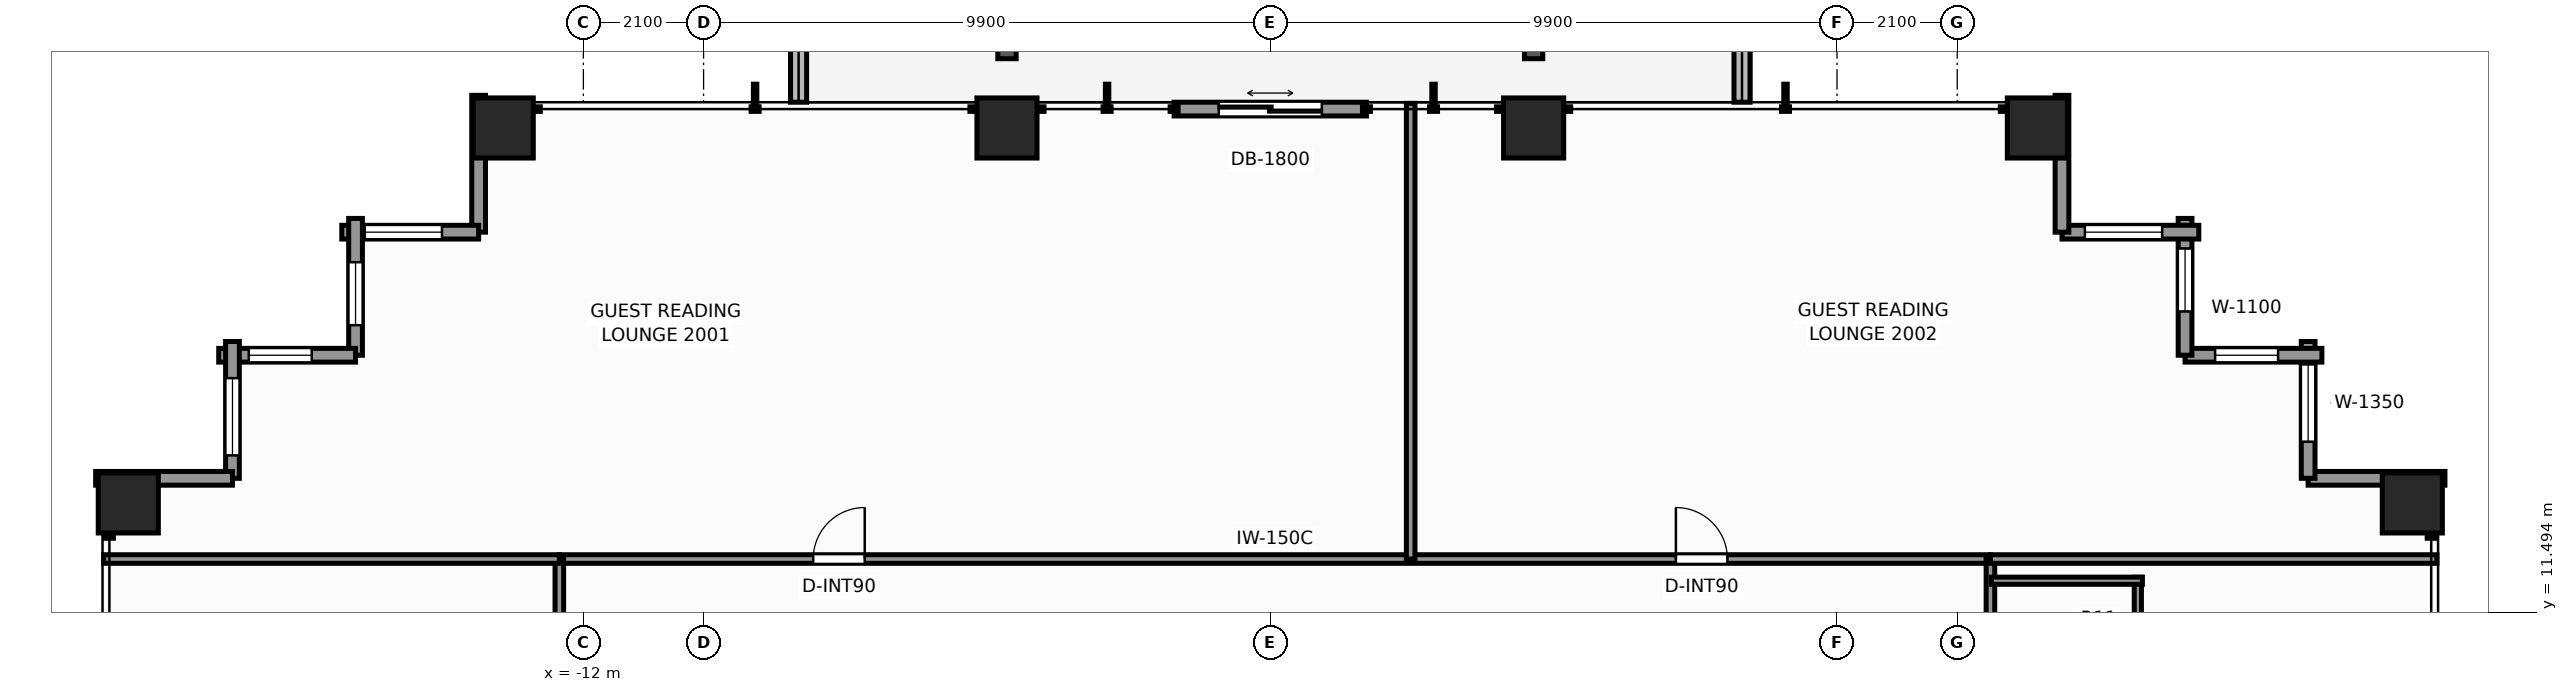
"""IFC4 building model, lengths in metres.
Left out: names, types, materials, properties, quantities, classifications, styles, units other than length and angle.
Written with IfcOpenShell. Run it as: python <this file> out.ifc"""

import sys

from ifc_helpers import new_model, si_unit, direction, frame, frame_2d, origin, origin_2d, place, context, subcontext, project, spatial, rectangle, extrude, element, fill, save


model = new_model("IFC4")
c1 = context("Model", 3, precision=1e-05, world=origin(), true_north=direction((0.0, 1.0)))
c2 = subcontext(c1, "Body", "Model", "MODEL_VIEW")
j1 = project(units=[si_unit("LENGTHUNIT", "METRE"), si_unit("PLANEANGLEUNIT", "RADIAN")], contexts=[c1])
p1 = place(None, origin())
s1 = spatial("IfcSite", under=j1, at=p1, CompositionType="ELEMENT")
p2 = place(p1, origin())
s2 = spatial("IfcBuilding", under=s1, at=p2, CompositionType="ELEMENT")
p3 = place(p2, frame((0.0, 0.0, 72.2)))
s3 = spatial("IfcBuildingStorey", under=s2, at=p3, CompositionType="ELEMENT", Elevation=72.2)
for number, where, z_axis, x_axis in (
    (1, (-13.4, 19.95, 0.0), (0.0, 0.0, 1.0), (1.0, 0.0, 0.0)),
    (2, (-4.6, 19.95, 0.0), (0.0, 0.0, 1.0), (1.0, 0.0, 0.0)),
    (3, (4.6, 19.95, 0.0), (0.0, 0.0, 1.0), (1.0, 0.0, 0.0)),
    (4, (13.4, 19.95, 0.0), (0.0, 0.0, 1.0), (1.0, 0.0, 0.0)),
    (5, (-19.95, 13.4, 0.0), (0.0, 0.0, 1.0), (1.0, 0.0, 0.0)),
    (6, (19.95, 13.4, 0.0), (0.0, 0.0, 1.0), (1.0, 0.0, 0.0)),
):
    element("IfcColumn", number, at=place(p3, frame(where, z_axis=z_axis, x_axis=x_axis)), inside=s3, PredefinedType="COLUMN", context=c2, shape_type="SweptSolid", body=[
        extrude(rectangle(XDim=1.05, YDim=1.05, at=origin_2d()), origin(), (0.0, 0.0, 1.0), 3.3),
    ])
p4 = place(p3, frame((8.24, 20.4, -0.04), z_axis=(0.0, 0.0, 1.0), x_axis=(0.0, 1.0, 0.0)))
e7 = element("IfcWall", 7, at=p4, inside=s3, PredefinedType="PARAPET", context=c2, shape_type="SweptSolid", body=[
    extrude(rectangle(XDim=1.313, YDim=0.28, at=frame_2d((0.656, 0.0))), origin(), (0.0, 0.0, 1.0), 0.42),
])
p5 = place(p3, frame((-8.24, 22.74, -0.04), z_axis=(0.0, 0.0, 1.0), x_axis=(0.0, -1.0, 0.0)))
e8 = element("IfcWall", 8, at=p5, inside=s3, PredefinedType="PARAPET", context=c2, shape_type="SweptSolid", body=[
    extrude(rectangle(XDim=2.34, YDim=0.28, at=frame_2d((1.17, 0.0))), origin(), (0.0, 0.0, 1.0), 0.42),
])
p6 = place(p3, frame((18.13, 13.83, 0.0), z_axis=(0.0, 0.0, 1.0), x_axis=(1.0, 0.0, 0.0)))
e9 = element("IfcWall", 9, at=p6, inside=s3, PredefinedType="STANDARD", context=c2, shape_type="SweptSolid", body=[
    extrude(rectangle(XDim=2.39, YDim=0.24, at=frame_2d((1.195, 0.0))), origin(), (0.0, 0.0, 1.0), 2.459),
])
p7 = place(p3, frame((18.13, 16.22, 0.0), z_axis=(0.0, 0.0, 1.0), x_axis=(0.0, -1.0, 0.0)))
e10 = element("IfcWall", 10, at=p7, inside=s3, PredefinedType="STANDARD", context=c2, shape_type="SweptSolid", body=[
    extrude(rectangle(XDim=2.39, YDim=0.24, at=frame_2d((1.195, 0.0))), origin(), (0.0, 0.0, 1.0), 2.459),
])
p8 = place(p7, frame((0.4, 0.0, 0.65)))
e11 = element("IfcOpeningElement", 11, at=p8, cuts=e10, PredefinedType="OPENING", context=c2, shape_type="SweptSolid", body=[
    extrude(rectangle(XDim=1.35, YDim=1.55, at=frame_2d((0.675, 0.775))), frame((0.0, 0.13, 0.0), z_axis=(0.0, -1.0, 0.0), x_axis=(1.0, 0.0, 0.0)), (0.0, 0.0, 1.0), 0.26),
])
p9 = place(p3, frame((15.98, 15.98, 0.0), z_axis=(0.0, 0.0, 1.0), x_axis=(1.0, 0.0, 0.0)))
e12 = element("IfcWall", 12, at=p9, inside=s3, PredefinedType="STANDARD", context=c2, shape_type="SweptSolid", body=[
    extrude(rectangle(XDim=2.39, YDim=0.24, at=frame_2d((1.195, 0.0))), origin(), (0.0, 0.0, 1.0), 2.459),
])
p10 = place(p9, frame((0.525, 0.0, 0.65)))
e13 = element("IfcOpeningElement", 13, at=p10, cuts=e12, PredefinedType="OPENING", context=c2, shape_type="SweptSolid", body=[
    extrude(rectangle(XDim=1.1, YDim=1.45, at=frame_2d((0.55, 0.725))), frame((0.0, 0.13, 0.0), z_axis=(0.0, -1.0, 0.0), x_axis=(1.0, 0.0, 0.0)), (0.0, 0.0, 1.0), 0.26),
])
p11 = place(p3, frame((15.98, 18.37, 0.0), z_axis=(0.0, 0.0, 1.0), x_axis=(0.0, -1.0, 0.0)))
e14 = element("IfcWall", 14, at=p11, inside=s3, PredefinedType="STANDARD", context=c2, shape_type="SweptSolid", body=[
    extrude(rectangle(XDim=2.39, YDim=0.24, at=frame_2d((1.195, 0.0))), origin(), (0.0, 0.0, 1.0), 2.459),
])
p12 = place(p11, frame((0.525, 0.0, 0.65)))
e15 = element("IfcOpeningElement", 15, at=p12, cuts=e14, PredefinedType="OPENING", context=c2, shape_type="SweptSolid", body=[
    extrude(rectangle(XDim=1.1, YDim=1.45, at=frame_2d((0.55, 0.725))), frame((0.0, 0.13, 0.0), z_axis=(0.0, -1.0, 0.0), x_axis=(1.0, 0.0, 0.0)), (0.0, 0.0, 1.0), 0.26),
])
p13 = place(p3, frame((13.83, 18.13, 0.0), z_axis=(0.0, 0.0, 1.0), x_axis=(1.0, 0.0, 0.0)))
e16 = element("IfcWall", 16, at=p13, inside=s3, PredefinedType="STANDARD", context=c2, shape_type="SweptSolid", body=[
    extrude(rectangle(XDim=2.39, YDim=0.24, at=frame_2d((1.195, 0.0))), origin(), (0.0, 0.0, 1.0), 2.459),
])
p14 = place(p13, frame((0.4, 0.0, 0.65)))
e17 = element("IfcOpeningElement", 17, at=p14, cuts=e16, PredefinedType="OPENING", context=c2, shape_type="SweptSolid", body=[
    extrude(rectangle(XDim=1.35, YDim=1.55, at=frame_2d((0.675, 0.775))), frame((0.0, 0.13, 0.0), z_axis=(0.0, -1.0, 0.0), x_axis=(1.0, 0.0, 0.0)), (0.0, 0.0, 1.0), 0.26),
])
p15 = place(p3, frame((13.83, 20.52, 0.0), z_axis=(0.0, 0.0, 1.0), x_axis=(0.0, -1.0, 0.0)))
e18 = element("IfcWall", 18, at=p15, inside=s3, PredefinedType="STANDARD", context=c2, shape_type="SweptSolid", body=[
    extrude(rectangle(XDim=2.39, YDim=0.24, at=frame_2d((1.195, 0.0))), origin(), (0.0, 0.0, 1.0), 2.459),
])
p16 = place(p3, frame((-1.68, 20.28, 0.0), z_axis=(0.0, 0.0, 1.0), x_axis=(1.0, 0.0, 0.0)))
e19 = element("IfcWall", 19, at=p16, inside=s3, PredefinedType="STANDARD", context=c2, shape_type="SweptSolid", body=[
    extrude(rectangle(XDim=3.36, YDim=0.24, at=frame_2d((1.68, 0.0))), origin(), (0.0, 0.0, 1.0), 3.08),
])
p17 = place(p16, frame((0.78, 0.0, 0.0)))
e20 = element("IfcOpeningElement", 20, at=p17, cuts=e19, PredefinedType="OPENING", context=c2, shape_type="SweptSolid", body=[
    extrude(rectangle(XDim=1.8, YDim=2.2, at=frame_2d((0.9, 1.1))), frame((0.0, 0.13, 0.0), z_axis=(0.0, -1.0, 0.0), x_axis=(1.0, 0.0, 0.0)), (0.0, 0.0, 1.0), 0.26),
])
p18 = place(p3, frame((-13.83, 18.13, 0.0), z_axis=(0.0, 0.0, 1.0), x_axis=(0.0, 1.0, 0.0)))
e21 = element("IfcWall", 21, at=p18, inside=s3, PredefinedType="STANDARD", context=c2, shape_type="SweptSolid", body=[
    extrude(rectangle(XDim=2.39, YDim=0.24, at=frame_2d((1.195, 0.0))), origin(), (0.0, 0.0, 1.0), 2.459),
])
p19 = place(p3, frame((-16.22, 18.13, 0.0), z_axis=(0.0, 0.0, 1.0), x_axis=(1.0, 0.0, 0.0)))
e22 = element("IfcWall", 22, at=p19, inside=s3, PredefinedType="STANDARD", context=c2, shape_type="SweptSolid", body=[
    extrude(rectangle(XDim=2.39, YDim=0.24, at=frame_2d((1.195, 0.0))), origin(), (0.0, 0.0, 1.0), 2.459),
])
p20 = place(p19, frame((0.4, 0.0, 0.65)))
e23 = element("IfcOpeningElement", 23, at=p20, cuts=e22, PredefinedType="OPENING", context=c2, shape_type="SweptSolid", body=[
    extrude(rectangle(XDim=1.35, YDim=1.55, at=frame_2d((0.675, 0.775))), frame((0.0, 0.13, 0.0), z_axis=(0.0, -1.0, 0.0), x_axis=(1.0, 0.0, 0.0)), (0.0, 0.0, 1.0), 0.26),
])
p21 = place(p3, frame((-15.98, 15.98, 0.0), z_axis=(0.0, 0.0, 1.0), x_axis=(0.0, 1.0, 0.0)))
e24 = element("IfcWall", 24, at=p21, inside=s3, PredefinedType="STANDARD", context=c2, shape_type="SweptSolid", body=[
    extrude(rectangle(XDim=2.39, YDim=0.24, at=frame_2d((1.195, 0.0))), origin(), (0.0, 0.0, 1.0), 2.459),
])
p22 = place(p21, frame((0.525, 0.0, 0.65)))
e25 = element("IfcOpeningElement", 25, at=p22, cuts=e24, PredefinedType="OPENING", context=c2, shape_type="SweptSolid", body=[
    extrude(rectangle(XDim=1.1, YDim=1.45, at=frame_2d((0.55, 0.725))), frame((0.0, 0.13, 0.0), z_axis=(0.0, -1.0, 0.0), x_axis=(1.0, 0.0, 0.0)), (0.0, 0.0, 1.0), 0.26),
])
p23 = place(p3, frame((-18.37, 15.98, 0.0), z_axis=(0.0, 0.0, 1.0), x_axis=(1.0, 0.0, 0.0)))
e26 = element("IfcWall", 26, at=p23, inside=s3, PredefinedType="STANDARD", context=c2, shape_type="SweptSolid", body=[
    extrude(rectangle(XDim=2.39, YDim=0.24, at=frame_2d((1.195, 0.0))), origin(), (0.0, 0.0, 1.0), 2.459),
])
p24 = place(p23, frame((0.525, 0.0, 0.65)))
e27 = element("IfcOpeningElement", 27, at=p24, cuts=e26, PredefinedType="OPENING", context=c2, shape_type="SweptSolid", body=[
    extrude(rectangle(XDim=1.1, YDim=1.45, at=frame_2d((0.55, 0.725))), frame((0.0, 0.13, 0.0), z_axis=(0.0, -1.0, 0.0), x_axis=(1.0, 0.0, 0.0)), (0.0, 0.0, 1.0), 0.26),
])
p25 = place(p3, frame((-18.13, 13.83, 0.0), z_axis=(0.0, 0.0, 1.0), x_axis=(0.0, 1.0, 0.0)))
e28 = element("IfcWall", 28, at=p25, inside=s3, PredefinedType="STANDARD", context=c2, shape_type="SweptSolid", body=[
    extrude(rectangle(XDim=2.39, YDim=0.24, at=frame_2d((1.195, 0.0))), origin(), (0.0, 0.0, 1.0), 2.459),
])
p26 = place(p25, frame((0.4, 0.0, 0.65)))
e29 = element("IfcOpeningElement", 29, at=p26, cuts=e28, PredefinedType="OPENING", context=c2, shape_type="SweptSolid", body=[
    extrude(rectangle(XDim=1.35, YDim=1.55, at=frame_2d((0.675, 0.775))), frame((0.0, 0.13, 0.0), z_axis=(0.0, -1.0, 0.0), x_axis=(1.0, 0.0, 0.0)), (0.0, 0.0, 1.0), 0.26),
])
p27 = place(p3, frame((-20.52, 13.83, 0.0), z_axis=(0.0, 0.0, 1.0), x_axis=(1.0, 0.0, 0.0)))
e30 = element("IfcWall", 30, at=p27, inside=s3, PredefinedType="STANDARD", context=c2, shape_type="SweptSolid", body=[
    extrude(rectangle(XDim=2.39, YDim=0.24, at=frame_2d((1.195, 0.0))), origin(), (0.0, 0.0, 1.0), 2.459),
])
p28 = place(p3, frame((-12.42, 12.42, 0.0), z_axis=(0.0, 0.0, 1.0), x_axis=(1.0, 0.0, 0.0)))
e31 = element("IfcWall", 31, at=p28, inside=s3, PredefinedType="PARTITIONING", context=c2, shape_type="SweptSolid", body=[
    extrude(rectangle(XDim=25.0, YDim=0.15, at=frame_2d((12.5, 0.0))), origin(), (0.0, 0.0, 1.0), 2.292),
])
p29 = place(p28, frame((4.435, 0.0, 0.0)))
e32 = element("IfcOpeningElement", 32, at=p29, cuts=e31, PredefinedType="OPENING", context=c2, shape_type="SweptSolid", body=[
    extrude(rectangle(XDim=0.9, YDim=2.06, at=frame_2d((0.45, 1.03))), frame((0.0, 0.085, 0.0), z_axis=(0.0, -1.0, 0.0), x_axis=(1.0, 0.0, 0.0)), (0.0, 0.0, 1.0), 0.17),
])
p30 = place(p28, frame((19.505, 0.0, 0.0)))
e33 = element("IfcOpeningElement", 33, at=p30, cuts=e31, PredefinedType="OPENING", context=c2, shape_type="SweptSolid", body=[
    extrude(rectangle(XDim=0.9, YDim=2.06, at=frame_2d((0.45, 1.03))), frame((0.0, 0.085, 0.0), z_axis=(0.0, -1.0, 0.0), x_axis=(1.0, 0.0, 0.0)), (0.0, 0.0, 1.0), 0.17),
])
p31 = place(p3, frame((-12.42, 7.4, 0.0), z_axis=(0.0, 0.0, 1.0), x_axis=(0.0, 1.0, 0.0)))
e34 = element("IfcWall", 34, at=p31, inside=s3, PredefinedType="PARTITIONING", context=c2, shape_type="SweptSolid", body=[
    extrude(rectangle(XDim=5.02, YDim=0.15, at=frame_2d((2.51, 0.0))), origin(), (0.0, 0.0, 1.0), 2.292),
])
p32 = place(p31, frame((0.811, 0.0, 0.0)))
e35 = element("IfcOpeningElement", 35, at=p32, cuts=e34, PredefinedType="OPENING", context=c2, shape_type="SweptSolid", body=[
    extrude(rectangle(XDim=0.9, YDim=2.06, at=frame_2d((0.45, 1.03))), frame((0.0, 0.085, 0.0), z_axis=(0.0, -1.0, 0.0), x_axis=(1.0, 0.0, 0.0)), (0.0, 0.0, 1.0), 0.17),
])
p33 = place(p3, frame((12.58, -12.42, 0.0), z_axis=(0.0, 0.0, 1.0), x_axis=(0.0, 1.0, 0.0)))
e36 = element("IfcWall", 36, at=p33, inside=s3, PredefinedType="PARTITIONING", context=c2, shape_type="SweptSolid", body=[
    extrude(rectangle(XDim=24.84, YDim=0.15, at=frame_2d((12.42, 0.0))), origin(), (0.0, 0.0, 1.0), 2.292),
])
p34 = place(p33, frame((4.435, 0.0, 0.0)))
e37 = element("IfcOpeningElement", 37, at=p34, cuts=e36, PredefinedType="OPENING", context=c2, shape_type="SweptSolid", body=[
    extrude(rectangle(XDim=0.9, YDim=2.06, at=frame_2d((0.45, 1.03))), frame((0.0, 0.085, 0.0), z_axis=(0.0, -1.0, 0.0), x_axis=(1.0, 0.0, 0.0)), (0.0, 0.0, 1.0), 0.17),
])
p35 = place(p33, frame((13.941, 0.0, 0.0)))
e38 = element("IfcOpeningElement", 38, at=p35, cuts=e36, PredefinedType="OPENING", context=c2, shape_type="SweptSolid", body=[
    extrude(rectangle(XDim=0.9, YDim=2.06, at=frame_2d((0.45, 1.03))), frame((0.0, 0.085, 0.0), z_axis=(0.0, -1.0, 0.0), x_axis=(1.0, 0.0, 0.0)), (0.0, 0.0, 1.0), 0.17),
])
p36 = place(p33, frame((18.322, 0.0, 0.0)))
e39 = element("IfcOpeningElement", 39, at=p36, cuts=e36, PredefinedType="OPENING", context=c2, shape_type="SweptSolid", body=[
    extrude(rectangle(XDim=0.9, YDim=2.06, at=frame_2d((0.45, 1.03))), frame((0.0, 0.085, 0.0), z_axis=(0.0, -1.0, 0.0), x_axis=(1.0, 0.0, 0.0)), (0.0, 0.0, 1.0), 0.17),
])
p37 = place(p33, frame((20.442, 0.0, 0.0)))
e40 = element("IfcOpeningElement", 40, at=p37, cuts=e36, PredefinedType="OPENING", context=c2, shape_type="SweptSolid", body=[
    extrude(rectangle(XDim=0.95, YDim=2.06, at=frame_2d((0.475, 1.03))), frame((0.0, 0.085, 0.0), z_axis=(0.0, -1.0, 0.0), x_axis=(1.0, 0.0, 0.0)), (0.0, 0.0, 1.0), 0.17),
])
p38 = place(p3, frame((-20.38, 12.42, 0.0), z_axis=(0.0, 0.0, 1.0), x_axis=(1.0, 0.0, 0.0)))
e41 = element("IfcWall", 41, at=p38, inside=s3, PredefinedType="PARTITIONING", context=c2, shape_type="SweptSolid", body=[
    extrude(rectangle(XDim=7.96, YDim=0.15, at=frame_2d((3.98, 0.0))), origin(), (0.0, 0.0, 1.0), 2.292),
])
p39 = place(p3, frame((12.58, 12.42, 0.0), z_axis=(0.0, 0.0, 1.0), x_axis=(1.0, 0.0, 0.0)))
e42 = element("IfcWall", 42, at=p39, inside=s3, PredefinedType="PARTITIONING", context=c2, shape_type="SweptSolid", body=[
    extrude(rectangle(XDim=7.8, YDim=0.15, at=frame_2d((3.9, 0.0))), origin(), (0.0, 0.0, 1.0), 2.292),
])
p40 = place(p3, frame((2.452, 12.42, 0.0), z_axis=(0.0, 0.0, 1.0), x_axis=(0.0, 1.0, 0.0)))
e43 = element("IfcWall", 43, at=p40, inside=s3, PredefinedType="PARTITIONING", context=c2, shape_type="SweptSolid", body=[
    extrude(rectangle(XDim=7.96, YDim=0.15, at=frame_2d((3.98, 0.0))), origin(), (0.0, 0.0, 1.0), 2.449),
])
p41 = place(p3, frame((15.155, 9.581, 0.0), z_axis=(0.0, 0.0, 1.0), x_axis=(0.0, 1.0, 0.0)))
e44 = element("IfcWall", 44, at=p41, inside=s3, PredefinedType="PARTITIONING", context=c2, shape_type="SweptSolid", body=[
    extrude(rectangle(XDim=2.52, YDim=0.125, at=frame_2d((1.26, 0.0))), origin(), (0.0, 0.0, 1.0), 2.292),
])
p42 = place(p3, frame((12.595, 12.041, 0.0), z_axis=(0.0, 0.0, 1.0), x_axis=(1.0, 0.0, 0.0)))
e45 = element("IfcWall", 45, at=p42, inside=s3, PredefinedType="PARTITIONING", context=c2, shape_type="SweptSolid", body=[
    extrude(rectangle(XDim=2.64, YDim=0.125, at=frame_2d((1.32, 0.0))), origin(), (0.0, 0.0, 1.0), 3.08),
])
p43 = place(p8, origin())
e46 = element("IfcWindow", 46, at=p43, inside=s3, PartitioningType="SINGLE_PANEL", PredefinedType="WINDOW", context=c2, shape_type="SweptSolid", body=[
    extrude(rectangle(XDim=1.35, YDim=1.55, at=frame_2d((0.675, 0.775))), frame((0.0, 0.03, 0.0), z_axis=(0.0, -1.0, 0.0), x_axis=(1.0, 0.0, 0.0)), (0.0, 0.0, 1.0), 0.06),
])
fill(e11, e46)
p44 = place(p10, origin())
e47 = element("IfcWindow", 47, at=p44, inside=s3, PartitioningType="SINGLE_PANEL", PredefinedType="WINDOW", context=c2, shape_type="SweptSolid", body=[
    extrude(rectangle(XDim=1.1, YDim=1.45, at=frame_2d((0.55, 0.725))), frame((0.0, 0.03, 0.0), z_axis=(0.0, -1.0, 0.0), x_axis=(1.0, 0.0, 0.0)), (0.0, 0.0, 1.0), 0.06),
])
fill(e13, e47)
p45 = place(p12, origin())
e48 = element("IfcWindow", 48, at=p45, inside=s3, PartitioningType="SINGLE_PANEL", PredefinedType="WINDOW", context=c2, shape_type="SweptSolid", body=[
    extrude(rectangle(XDim=1.1, YDim=1.45, at=frame_2d((0.55, 0.725))), frame((0.0, 0.03, 0.0), z_axis=(0.0, -1.0, 0.0), x_axis=(1.0, 0.0, 0.0)), (0.0, 0.0, 1.0), 0.06),
])
fill(e15, e48)
p46 = place(p14, origin())
e49 = element("IfcWindow", 49, at=p46, inside=s3, PartitioningType="SINGLE_PANEL", PredefinedType="WINDOW", context=c2, shape_type="SweptSolid", body=[
    extrude(rectangle(XDim=1.35, YDim=1.55, at=frame_2d((0.675, 0.775))), frame((0.0, 0.03, 0.0), z_axis=(0.0, -1.0, 0.0), x_axis=(1.0, 0.0, 0.0)), (0.0, 0.0, 1.0), 0.06),
])
fill(e17, e49)
p47 = place(p17, origin())
e50 = element("IfcDoor", 50, at=p47, inside=s3, OperationType="DOUBLE_DOOR_SLIDING", PredefinedType="DOOR", context=c2, shape_type="SweptSolid", body=[
    extrude(rectangle(XDim=1.8, YDim=2.2, at=frame_2d((0.9, 1.1))), frame((0.0, 0.025, 0.0), z_axis=(0.0, -1.0, 0.0), x_axis=(1.0, 0.0, 0.0)), (0.0, 0.0, 1.0), 0.05),
])
fill(e20, e50)
p48 = place(p20, origin())
e51 = element("IfcWindow", 51, at=p48, inside=s3, PartitioningType="SINGLE_PANEL", PredefinedType="WINDOW", context=c2, shape_type="SweptSolid", body=[
    extrude(rectangle(XDim=1.35, YDim=1.55, at=frame_2d((0.675, 0.775))), frame((0.0, 0.03, 0.0), z_axis=(0.0, -1.0, 0.0), x_axis=(1.0, 0.0, 0.0)), (0.0, 0.0, 1.0), 0.06),
])
fill(e23, e51)
p49 = place(p22, origin())
e52 = element("IfcWindow", 52, at=p49, inside=s3, PartitioningType="SINGLE_PANEL", PredefinedType="WINDOW", context=c2, shape_type="SweptSolid", body=[
    extrude(rectangle(XDim=1.1, YDim=1.45, at=frame_2d((0.55, 0.725))), frame((0.0, 0.03, 0.0), z_axis=(0.0, -1.0, 0.0), x_axis=(1.0, 0.0, 0.0)), (0.0, 0.0, 1.0), 0.06),
])
fill(e25, e52)
p50 = place(p24, origin())
e53 = element("IfcWindow", 53, at=p50, inside=s3, PartitioningType="SINGLE_PANEL", PredefinedType="WINDOW", context=c2, shape_type="SweptSolid", body=[
    extrude(rectangle(XDim=1.1, YDim=1.45, at=frame_2d((0.55, 0.725))), frame((0.0, 0.03, 0.0), z_axis=(0.0, -1.0, 0.0), x_axis=(1.0, 0.0, 0.0)), (0.0, 0.0, 1.0), 0.06),
])
fill(e27, e53)
p51 = place(p26, origin())
e54 = element("IfcWindow", 54, at=p51, inside=s3, PartitioningType="SINGLE_PANEL", PredefinedType="WINDOW", context=c2, shape_type="SweptSolid", body=[
    extrude(rectangle(XDim=1.35, YDim=1.55, at=frame_2d((0.675, 0.775))), frame((0.0, 0.03, 0.0), z_axis=(0.0, -1.0, 0.0), x_axis=(1.0, 0.0, 0.0)), (0.0, 0.0, 1.0), 0.06),
])
fill(e29, e54)
p52 = place(p29, origin())
e55 = element("IfcDoor", 55, at=p52, inside=s3, OperationType="SINGLE_SWING_RIGHT", PredefinedType="DOOR", context=c2, shape_type="SweptSolid", body=[
    extrude(rectangle(XDim=0.9, YDim=2.06, at=frame_2d((0.45, 1.03))), frame((0.0, 0.025, 0.0), z_axis=(0.0, -1.0, 0.0), x_axis=(1.0, 0.0, 0.0)), (0.0, 0.0, 1.0), 0.05),
])
fill(e32, e55)
p53 = place(p30, origin())
e56 = element("IfcDoor", 56, at=p53, inside=s3, OperationType="SINGLE_SWING_LEFT", PredefinedType="DOOR", context=c2, shape_type="SweptSolid", body=[
    extrude(rectangle(XDim=0.9, YDim=2.06, at=frame_2d((0.45, 1.03))), frame((0.0, 0.025, 0.0), z_axis=(0.0, -1.0, 0.0), x_axis=(1.0, 0.0, 0.0)), (0.0, 0.0, 1.0), 0.05),
])
fill(e33, e56)
save(model, sys.argv[1])
